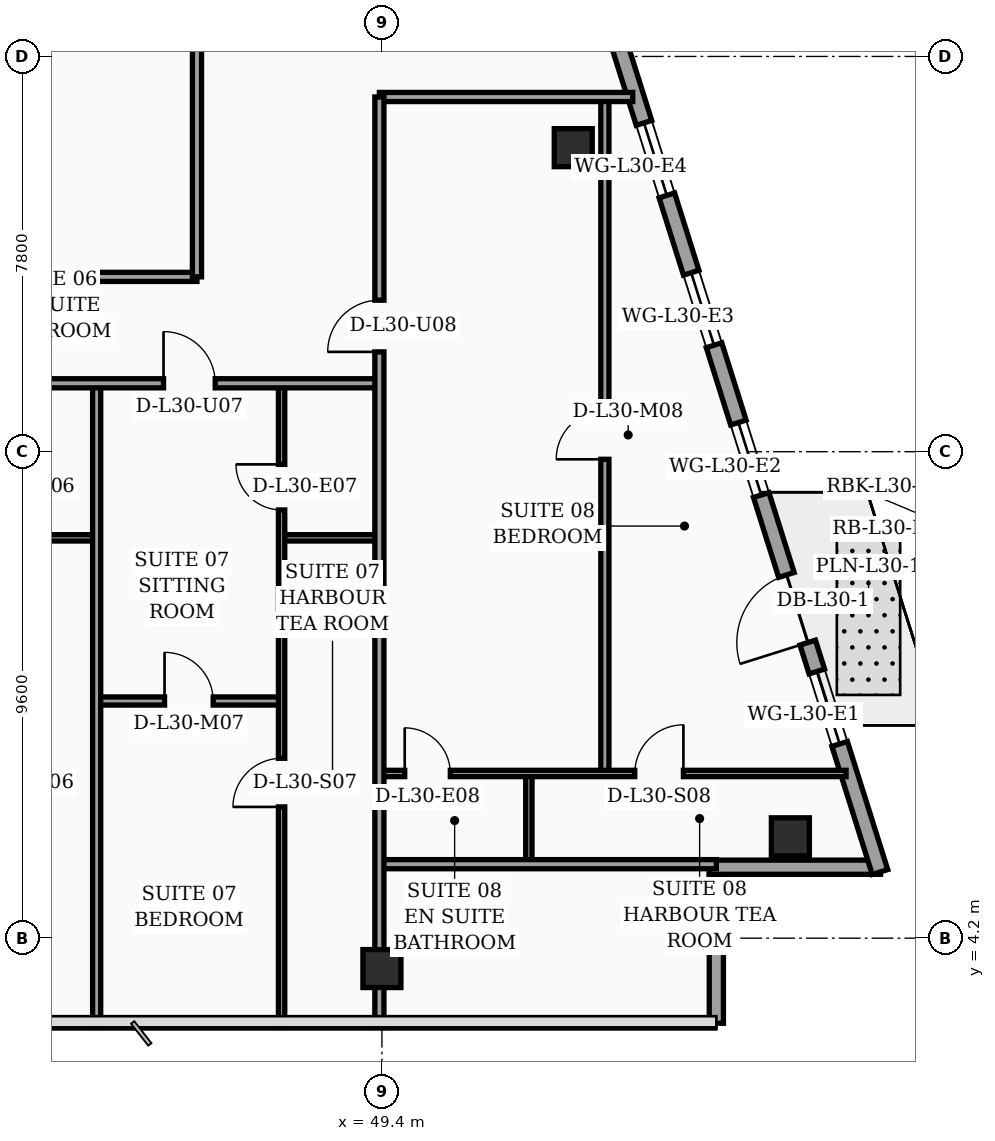
"""IFC4 building model, lengths in metres.
Left out: names, types, materials, properties, quantities, classifications, styles, units other than length and angle.
Written with IfcOpenShell. Run it as: python <this file> out.ifc"""

import sys

from ifc_helpers import new_model, si_unit, direction, frame, frame_2d, origin, origin_2d, place, context, subcontext, project, spatial, rectangle, hollow_rectangle, extrude, element, fill, save


model = new_model("IFC4")
c1 = context("Model", 3, precision=1e-05, world=origin(), true_north=direction((0.0, 1.0)))
c2 = subcontext(c1, "Body", "Model", "MODEL_VIEW")
j1 = project(units=[si_unit("LENGTHUNIT", "METRE"), si_unit("PLANEANGLEUNIT", "RADIAN")], contexts=[c1])
p1 = place(None, origin())
s1 = spatial("IfcSite", under=j1, at=p1, CompositionType="ELEMENT")
p2 = place(p1, origin())
s2 = spatial("IfcBuilding", under=s1, at=p2, CompositionType="ELEMENT")
p3 = place(p2, frame((0.0, 0.0, 124.0)))
s3 = spatial("IfcBuildingStorey", under=s2, at=p3, CompositionType="ELEMENT", Elevation=124.0)
for number, where, z_axis, x_axis in (
    (1, (49.4, 3.6, 0.0), (0.0, 0.0, 1.0), (1.0, 0.0, 0.0)),
    (2, (57.461, 6.2, 0.0), (0.0, 0.0, 1.0), (1.0, 0.0, 0.0)),
    (3, (53.176, 19.8, 0.0), (0.0, 0.0, 1.0), (1.0, 0.0, 0.0)),
):
    element("IfcColumn", number, at=place(p3, frame(where, z_axis=z_axis, x_axis=x_axis)), inside=s3, PredefinedType="COLUMN", context=c2, shape_type="SweptSolid", body=[
        extrude(hollow_rectangle(XDim=0.75, YDim=0.75, WallThickness=0.032, at=origin_2d()), origin(), (0.0, 0.0, 1.0), 3.56),
    ])
p4 = place(p3, frame((56.0, 2.52, 0.0), z_axis=(0.0, 0.0, 1.0), x_axis=(0.0, 1.0, 0.0)))
e4 = element("IfcWall", 4, at=p4, inside=s3, PredefinedType="SOLIDWALL", context=c2, shape_type="SweptSolid", body=[
    extrude(rectangle(XDim=2.94, YDim=0.28, at=frame_2d((1.47, 0.0))), origin(), (0.0, 0.0, 1.0), 3.04),
])
p5 = place(p3, frame((55.86, 5.6, 0.0), z_axis=(0.0, 0.0, 1.0), x_axis=(1.0, 0.0, 0.0)))
e5 = element("IfcWall", 5, at=p5, inside=s3, PredefinedType="SOLIDWALL", context=c2, shape_type="SweptSolid", body=[
    extrude(rectangle(XDim=3.38, YDim=0.28, at=frame_2d((1.69, 0.0))), origin(), (0.0, 0.0, 1.0), 3.04),
])
p6 = place(p3, frame((59.23, 5.505, 0.0), z_axis=(0.0, 0.0, 1.0), x_axis=(-0.300509063924, 0.953778958931, 0.0)))
e6 = element("IfcWall", 6, at=p6, inside=s3, PredefinedType="SOLIDWALL", context=c2, shape_type="SweptSolid", body=[
    extrude(rectangle(XDim=30.814, YDim=0.32, at=frame_2d((15.407, 0.0))), origin(), (0.0, 0.0, 1.0), 3.56),
])
p7 = place(p6, frame((4.747, 0.0, 0.0)))
e7 = element("IfcOpeningElement", 7, at=p7, cuts=e6, PredefinedType="OPENING", context=c2, shape_type="SweptSolid", body=[
    extrude(rectangle(XDim=1.4, YDim=2.25, at=frame_2d((0.7, 1.125))), frame((0.0, 0.17, 0.0), z_axis=(0.0, -1.0, 0.0), x_axis=(1.0, 0.0, 0.0)), (0.0, 0.0, 1.0), 0.34),
])
p8 = place(p6, frame((2.65, 0.0, 0.75)))
e8 = element("IfcOpeningElement", 8, at=p8, cuts=e6, PredefinedType="OPENING", context=c2, shape_type="SweptSolid", body=[
    extrude(rectangle(XDim=1.5, YDim=1.6, at=frame_2d((0.75, 0.8))), frame((0.0, 0.17, 0.0), z_axis=(0.0, -1.0, 0.0), x_axis=(1.0, 0.0, 0.0)), (0.0, 0.0, 1.0), 0.34),
])
p9 = place(p6, frame((7.8, 0.0, 0.75)))
e9 = element("IfcOpeningElement", 9, at=p9, cuts=e6, PredefinedType="OPENING", context=c2, shape_type="SweptSolid", body=[
    extrude(rectangle(XDim=1.5, YDim=1.6, at=frame_2d((0.75, 0.8))), frame((0.0, 0.17, 0.0), z_axis=(0.0, -1.0, 0.0), x_axis=(1.0, 0.0, 0.0)), (0.0, 0.0, 1.0), 0.34),
])
p10 = place(p6, frame((10.9, 0.0, 0.75)))
e10 = element("IfcOpeningElement", 10, at=p10, cuts=e6, PredefinedType="OPENING", context=c2, shape_type="SweptSolid", body=[
    extrude(rectangle(XDim=1.5, YDim=1.6, at=frame_2d((0.75, 0.8))), frame((0.0, 0.17, 0.0), z_axis=(0.0, -1.0, 0.0), x_axis=(1.0, 0.0, 0.0)), (0.0, 0.0, 1.0), 0.34),
])
p11 = place(p6, frame((14.0, 0.0, 0.75)))
e11 = element("IfcOpeningElement", 11, at=p11, cuts=e6, PredefinedType="OPENING", context=c2, shape_type="SweptSolid", body=[
    extrude(rectangle(XDim=1.5, YDim=1.6, at=frame_2d((0.75, 0.8))), frame((0.0, 0.17, 0.0), z_axis=(0.0, -1.0, 0.0), x_axis=(1.0, 0.0, 0.0)), (0.0, 0.0, 1.0), 0.34),
])
p12 = place(p6, frame((17.1, 0.0, 0.75)))
e12 = element("IfcOpeningElement", 12, at=p12, cuts=e6, PredefinedType="OPENING", context=c2, shape_type="SweptSolid", body=[
    extrude(rectangle(XDim=1.5, YDim=1.6, at=frame_2d((0.75, 0.8))), frame((0.0, 0.17, 0.0), z_axis=(0.0, -1.0, 0.0), x_axis=(1.0, 0.0, 0.0)), (0.0, 0.0, 1.0), 0.34),
])
p13 = place(p6, frame((20.2, 0.0, 0.75)))
e13 = element("IfcOpeningElement", 13, at=p13, cuts=e6, PredefinedType="OPENING", context=c2, shape_type="SweptSolid", body=[
    extrude(rectangle(XDim=1.5, YDim=1.6, at=frame_2d((0.75, 0.8))), frame((0.0, 0.17, 0.0), z_axis=(0.0, -1.0, 0.0), x_axis=(1.0, 0.0, 0.0)), (0.0, 0.0, 1.0), 0.34),
])
p14 = place(p6, frame((23.3, 0.0, 0.75)))
e14 = element("IfcOpeningElement", 14, at=p14, cuts=e6, PredefinedType="OPENING", context=c2, shape_type="SweptSolid", body=[
    extrude(rectangle(XDim=1.5, YDim=1.6, at=frame_2d((0.75, 0.8))), frame((0.0, 0.17, 0.0), z_axis=(0.0, -1.0, 0.0), x_axis=(1.0, 0.0, 0.0)), (0.0, 0.0, 1.0), 0.34),
])
p15 = place(p6, frame((26.4, 0.0, 0.75)))
e15 = element("IfcOpeningElement", 15, at=p15, cuts=e6, PredefinedType="OPENING", context=c2, shape_type="SweptSolid", body=[
    extrude(rectangle(XDim=1.5, YDim=1.6, at=frame_2d((0.75, 0.8))), frame((0.0, 0.17, 0.0), z_axis=(0.0, -1.0, 0.0), x_axis=(1.0, 0.0, 0.0)), (0.0, 0.0, 1.0), 0.34),
])
p16 = place(p3, frame((41.84, 12.1, 0.0), z_axis=(0.0, 0.0, 1.0), x_axis=(1.0, 0.0, 0.0)))
e16 = element("IfcWall", 16, at=p16, inside=s3, PredefinedType="PARTITIONING", context=c2, shape_type="SweptSolid", body=[
    extrude(rectangle(XDim=1.93, YDim=0.125, at=frame_2d((0.965, 0.0))), origin(), (0.0, 0.0, 1.0), 3.56),
])
p17 = place(p3, frame((47.42, 12.1, 0.0), z_axis=(0.0, 0.0, 1.0), x_axis=(1.0, 0.0, 0.0)))
e17 = element("IfcWall", 17, at=p17, inside=s3, PredefinedType="PARTITIONING", context=c2, shape_type="SweptSolid", body=[
    extrude(rectangle(XDim=1.93, YDim=0.125, at=frame_2d((0.965, 0.0))), origin(), (0.0, 0.0, 1.0), 2.84),
])
p18 = place(p3, frame((43.77, 8.88, 0.0), z_axis=(0.0, 0.0, 1.0), x_axis=(1.0, 0.0, 0.0)))
e18 = element("IfcWall", 18, at=p18, inside=s3, PredefinedType="PARTITIONING", context=c2, shape_type="SweptSolid", body=[
    extrude(rectangle(XDim=3.65, YDim=0.16, at=frame_2d((1.825, 0.0))), origin(), (0.0, 0.0, 1.0), 3.56),
])
p19 = place(p18, frame((1.34, 0.0, 0.0)))
e19 = element("IfcOpeningElement", 19, at=p19, cuts=e18, PredefinedType="OPENING", context=c2, shape_type="SweptSolid", body=[
    extrude(rectangle(XDim=0.96, YDim=2.2, at=frame_2d((0.48, 1.1))), frame((0.0, 0.09, 0.0), z_axis=(0.0, -1.0, 0.0), x_axis=(1.0, 0.0, 0.0)), (0.0, 0.0, 1.0), 0.18),
])
p20 = place(p3, frame((47.42, 2.44, 0.0), z_axis=(0.0, 0.0, 1.0), x_axis=(0.0, 1.0, 0.0)))
e20 = element("IfcWall", 20, at=p20, inside=s3, PredefinedType="PARTITIONING", context=c2, shape_type="SweptSolid", body=[
    extrude(rectangle(XDim=12.71, YDim=0.125, at=frame_2d((6.355, 0.0))), origin(), (0.0, 0.0, 1.0), 2.84),
])
p21 = place(p20, frame((4.35, 0.0, 0.0)))
e21 = element("IfcOpeningElement", 21, at=p21, cuts=e20, PredefinedType="OPENING", context=c2, shape_type="SweptSolid", body=[
    extrude(rectangle(XDim=0.96, YDim=2.2, at=frame_2d((0.48, 1.1))), frame((0.0, 0.073, 0.0), z_axis=(0.0, -1.0, 0.0), x_axis=(1.0, 0.0, 0.0)), (0.0, 0.0, 1.0), 0.145),
])
p22 = place(p20, frame((10.21, 0.0, 0.0)))
e22 = element("IfcOpeningElement", 22, at=p22, cuts=e20, PredefinedType="OPENING", context=c2, shape_type="SweptSolid", body=[
    extrude(rectangle(XDim=0.9, YDim=2.15, at=frame_2d((0.45, 1.075))), frame((0.0, 0.073, 0.0), z_axis=(0.0, -1.0, 0.0), x_axis=(1.0, 0.0, 0.0)), (0.0, 0.0, 1.0), 0.145),
])
p23 = place(p3, frame((43.77, 2.44, 0.0), z_axis=(0.0, 0.0, 1.0), x_axis=(0.0, 1.0, 0.0)))
e23 = element("IfcWall", 23, at=p23, inside=s3, PredefinedType="PARTITIONING", context=c2, shape_type="SweptSolid", body=[
    extrude(rectangle(XDim=12.71, YDim=0.16, at=frame_2d((6.355, 0.0))), origin(), (0.0, 0.0, 1.0), 3.04),
])
p24 = place(p3, frame((32.4, 15.15, 0.0), z_axis=(0.0, 0.0, 1.0), x_axis=(1.0, 0.0, 0.0)))
e24 = element("IfcWall", 24, at=p24, inside=s3, PredefinedType="PARTITIONING", context=c2, shape_type="SweptSolid", body=[
    extrude(rectangle(XDim=16.95, YDim=0.18, at=frame_2d((8.475, 0.0))), origin(), (0.0, 0.0, 1.0), 2.84),
])
p25 = place(p24, frame((1.1, 0.0, 0.0)))
e25 = element("IfcOpeningElement", 25, at=p25, cuts=e24, PredefinedType="OPENING", context=c2, shape_type="SweptSolid", body=[
    extrude(rectangle(XDim=1.5, YDim=2.22, at=frame_2d((0.75, 1.11))), frame((0.0, 0.1, 0.0), z_axis=(0.0, -1.0, 0.0), x_axis=(1.0, 0.0, 0.0)), (0.0, 0.0, 1.0), 0.2),
])
p26 = place(p24, frame((6.78, 0.0, 0.0)))
e26 = element("IfcOpeningElement", 26, at=p26, cuts=e24, PredefinedType="OPENING", context=c2, shape_type="SweptSolid", body=[
    extrude(rectangle(XDim=1.02, YDim=2.2, at=frame_2d((0.51, 1.1))), frame((0.0, 0.1, 0.0), z_axis=(0.0, -1.0, 0.0), x_axis=(1.0, 0.0, 0.0)), (0.0, 0.0, 1.0), 0.2),
])
p27 = place(p24, frame((12.69, 0.0, 0.0)))
e27 = element("IfcOpeningElement", 27, at=p27, cuts=e24, PredefinedType="OPENING", context=c2, shape_type="SweptSolid", body=[
    extrude(rectangle(XDim=1.02, YDim=2.2, at=frame_2d((0.51, 1.1))), frame((0.0, 0.1, 0.0), z_axis=(0.0, -1.0, 0.0), x_axis=(1.0, 0.0, 0.0)), (0.0, 0.0, 1.0), 0.2),
])
p28 = place(p3, frame((21.5, 17.25, 0.0), z_axis=(0.0, 0.0, 1.0), x_axis=(1.0, 0.0, 0.0)))
e28 = element("IfcWall", 28, at=p28, inside=s3, PredefinedType="PARTITIONING", context=c2, shape_type="SweptSolid", body=[
    extrude(rectangle(XDim=24.25, YDim=0.18, at=frame_2d((12.125, 0.0))), origin(), (0.0, 0.0, 1.0), 2.84),
])
p29 = place(p28, frame((0.95, 0.0, 0.0)))
e29 = element("IfcOpeningElement", 29, at=p29, cuts=e28, PredefinedType="OPENING", context=c2, shape_type="SweptSolid", body=[
    extrude(rectangle(XDim=1.02, YDim=2.2, at=frame_2d((0.51, 1.1))), frame((0.0, 0.1, 0.0), z_axis=(0.0, -1.0, 0.0), x_axis=(1.0, 0.0, 0.0)), (0.0, 0.0, 1.0), 0.2),
])
p30 = place(p28, frame((9.0, 0.0, 0.0)))
e30 = element("IfcOpeningElement", 30, at=p30, cuts=e28, PredefinedType="OPENING", context=c2, shape_type="SweptSolid", body=[
    extrude(rectangle(XDim=1.02, YDim=2.2, at=frame_2d((0.51, 1.1))), frame((0.0, 0.1, 0.0), z_axis=(0.0, -1.0, 0.0), x_axis=(1.0, 0.0, 0.0)), (0.0, 0.0, 1.0), 0.2),
])
p31 = place(p28, frame((17.05, 0.0, 0.0)))
e31 = element("IfcOpeningElement", 31, at=p31, cuts=e28, PredefinedType="OPENING", context=c2, shape_type="SweptSolid", body=[
    extrude(rectangle(XDim=1.02, YDim=2.2, at=frame_2d((0.51, 1.1))), frame((0.0, 0.1, 0.0), z_axis=(0.0, -1.0, 0.0), x_axis=(1.0, 0.0, 0.0)), (0.0, 0.0, 1.0), 0.2),
])
p32 = place(p3, frame((45.75, 17.25, 0.0), z_axis=(0.0, 0.0, 1.0), x_axis=(0.0, 1.0, 0.0)))
e32 = element("IfcWall", 32, at=p32, inside=s3, PredefinedType="PARTITIONING", context=c2, shape_type="SweptSolid", body=[
    extrude(rectangle(XDim=20.69, YDim=0.18, at=frame_2d((10.345, 0.0))), origin(), (0.0, 0.0, 1.0), 2.84),
])
p33 = place(p3, frame((52.3, 5.66, 0.0), z_axis=(0.0, 0.0, 1.0), x_axis=(0.0, 1.0, 0.0)))
e33 = element("IfcWall", 33, at=p33, inside=s3, PredefinedType="PARTITIONING", context=c2, shape_type="SweptSolid", body=[
    extrude(rectangle(XDim=1.79, YDim=0.125, at=frame_2d((0.895, 0.0))), origin(), (0.0, 0.0, 1.0), 3.56),
])
p34 = place(p3, frame((53.8, 7.45, 0.0), z_axis=(0.0, 0.0, 1.0), x_axis=(0.0, 1.0, 0.0)))
e34 = element("IfcWall", 34, at=p34, inside=s3, PredefinedType="PARTITIONING", context=c2, shape_type="SweptSolid", body=[
    extrude(rectangle(XDim=13.35, YDim=0.16, at=frame_2d((6.675, 0.0))), origin(), (0.0, 0.0, 1.0), 3.04),
])
p35 = place(p34, frame((6.2, 0.0, 0.0)))
e35 = element("IfcOpeningElement", 35, at=p35, cuts=e34, PredefinedType="OPENING", context=c2, shape_type="SweptSolid", body=[
    extrude(rectangle(XDim=0.96, YDim=2.2, at=frame_2d((0.48, 1.1))), frame((0.0, 0.09, 0.0), z_axis=(0.0, -1.0, 0.0), x_axis=(1.0, 0.0, 0.0)), (0.0, 0.0, 1.0), 0.18),
])
p36 = place(p3, frame((49.35, 7.45, 0.0), z_axis=(0.0, 0.0, 1.0), x_axis=(1.0, 0.0, 0.0)))
e36 = element("IfcWall", 36, at=p36, inside=s3, PredefinedType="PARTITIONING", context=c2, shape_type="SweptSolid", body=[
    extrude(rectangle(XDim=9.21, YDim=0.125, at=frame_2d((4.605, 0.0))), origin(), (0.0, 0.0, 1.0), 3.04),
])
p37 = place(p36, frame((0.5, 0.0, 0.0)))
e37 = element("IfcOpeningElement", 37, at=p37, cuts=e36, PredefinedType="OPENING", context=c2, shape_type="SweptSolid", body=[
    extrude(rectangle(XDim=0.9, YDim=2.15, at=frame_2d((0.45, 1.075))), frame((0.0, 0.073, 0.0), z_axis=(0.0, -1.0, 0.0), x_axis=(1.0, 0.0, 0.0)), (0.0, 0.0, 1.0), 0.145),
])
p38 = place(p36, frame((5.04, 0.0, 0.0)))
e38 = element("IfcOpeningElement", 38, at=p38, cuts=e36, PredefinedType="OPENING", context=c2, shape_type="SweptSolid", body=[
    extrude(rectangle(XDim=0.96, YDim=2.2, at=frame_2d((0.48, 1.1))), frame((0.0, 0.073, 0.0), z_axis=(0.0, -1.0, 0.0), x_axis=(1.0, 0.0, 0.0)), (0.0, 0.0, 1.0), 0.145),
])
p39 = place(p3, frame((49.35, 5.66, 0.0), z_axis=(0.0, 0.0, 1.0), x_axis=(1.0, 0.0, 0.0)))
e39 = element("IfcWall", 39, at=p39, inside=s3, PredefinedType="PARTITIONING", context=c2, shape_type="SweptSolid", body=[
    extrude(rectangle(XDim=6.65, YDim=0.18, at=frame_2d((3.325, 0.0))), origin(), (0.0, 0.0, 1.0), 2.84),
])
p40 = place(p3, frame((49.35, 20.8, 0.0), z_axis=(0.0, 0.0, 1.0), x_axis=(1.0, 0.0, 0.0)))
e40 = element("IfcWall", 40, at=p40, inside=s3, PredefinedType="PARTITIONING", context=c2, shape_type="SweptSolid", body=[
    extrude(rectangle(XDim=5.0, YDim=0.18, at=frame_2d((2.5, 0.0))), origin(), (0.0, 0.0, 1.0), 3.04),
])
p41 = place(p3, frame((49.35, 2.44, 0.0), z_axis=(0.0, 0.0, 1.0), x_axis=(0.0, 1.0, 0.0)))
e41 = element("IfcWall", 41, at=p41, inside=s3, PredefinedType="PARTITIONING", context=c2, shape_type="SweptSolid", body=[
    extrude(rectangle(XDim=18.36, YDim=0.18, at=frame_2d((9.18, 0.0))), origin(), (0.0, 0.0, 1.0), 2.84),
])
p42 = place(p41, frame((13.33, 0.0, 0.0)))
e42 = element("IfcOpeningElement", 42, at=p42, cuts=e41, PredefinedType="OPENING", context=c2, shape_type="SweptSolid", body=[
    extrude(rectangle(XDim=1.02, YDim=2.2, at=frame_2d((0.51, 1.1))), frame((0.0, 0.1, 0.0), z_axis=(0.0, -1.0, 0.0), x_axis=(1.0, 0.0, 0.0)), (0.0, 0.0, 1.0), 0.2),
])
p43 = place(p7, origin())
e43 = element("IfcDoor", 43, at=p43, inside=s3, OperationType="SINGLE_SWING_LEFT", PredefinedType="DOOR", context=c2, shape_type="SweptSolid", body=[
    extrude(rectangle(XDim=1.4, YDim=2.25, at=frame_2d((0.7, 1.125))), frame((0.0, 0.025, 0.0), z_axis=(0.0, -1.0, 0.0), x_axis=(1.0, 0.0, 0.0)), (0.0, 0.0, 1.0), 0.05),
])
fill(e7, e43)
p44 = place(p8, origin())
e44 = element("IfcWindow", 44, at=p44, inside=s3, PartitioningType="SINGLE_PANEL", PredefinedType="WINDOW", context=c2, shape_type="SweptSolid", body=[
    extrude(rectangle(XDim=1.5, YDim=1.6, at=frame_2d((0.75, 0.8))), frame((0.0, 0.03, 0.0), z_axis=(0.0, -1.0, 0.0), x_axis=(1.0, 0.0, 0.0)), (0.0, 0.0, 1.0), 0.06),
])
fill(e8, e44)
p45 = place(p9, origin())
e45 = element("IfcWindow", 45, at=p45, inside=s3, PartitioningType="SINGLE_PANEL", PredefinedType="WINDOW", context=c2, shape_type="SweptSolid", body=[
    extrude(rectangle(XDim=1.5, YDim=1.6, at=frame_2d((0.75, 0.8))), frame((0.0, 0.03, 0.0), z_axis=(0.0, -1.0, 0.0), x_axis=(1.0, 0.0, 0.0)), (0.0, 0.0, 1.0), 0.06),
])
fill(e9, e45)
p46 = place(p10, origin())
e46 = element("IfcWindow", 46, at=p46, inside=s3, PartitioningType="SINGLE_PANEL", PredefinedType="WINDOW", context=c2, shape_type="SweptSolid", body=[
    extrude(rectangle(XDim=1.5, YDim=1.6, at=frame_2d((0.75, 0.8))), frame((0.0, 0.03, 0.0), z_axis=(0.0, -1.0, 0.0), x_axis=(1.0, 0.0, 0.0)), (0.0, 0.0, 1.0), 0.06),
])
fill(e10, e46)
p47 = place(p11, origin())
e47 = element("IfcWindow", 47, at=p47, inside=s3, PartitioningType="SINGLE_PANEL", PredefinedType="WINDOW", context=c2, shape_type="SweptSolid", body=[
    extrude(rectangle(XDim=1.5, YDim=1.6, at=frame_2d((0.75, 0.8))), frame((0.0, 0.03, 0.0), z_axis=(0.0, -1.0, 0.0), x_axis=(1.0, 0.0, 0.0)), (0.0, 0.0, 1.0), 0.06),
])
fill(e11, e47)
p48 = place(p19, origin())
e48 = element("IfcDoor", 48, at=p48, inside=s3, OperationType="SINGLE_SWING_LEFT", PredefinedType="DOOR", context=c2, shape_type="SweptSolid", body=[
    extrude(rectangle(XDim=0.96, YDim=2.2, at=frame_2d((0.48, 1.1))), frame((0.0, 0.025, 0.0), z_axis=(0.0, -1.0, 0.0), x_axis=(1.0, 0.0, 0.0)), (0.0, 0.0, 1.0), 0.05),
])
fill(e19, e48)
p49 = place(p21, origin())
e49 = element("IfcDoor", 49, at=p49, inside=s3, OperationType="SINGLE_SWING_LEFT", PredefinedType="DOOR", context=c2, shape_type="SweptSolid", body=[
    extrude(rectangle(XDim=0.96, YDim=2.2, at=frame_2d((0.48, 1.1))), frame((0.0, 0.025, 0.0), z_axis=(0.0, -1.0, 0.0), x_axis=(1.0, 0.0, 0.0)), (0.0, 0.0, 1.0), 0.05),
])
fill(e21, e49)
p50 = place(p22, origin())
e50 = element("IfcDoor", 50, at=p50, inside=s3, OperationType="SINGLE_SWING_RIGHT", PredefinedType="DOOR", context=c2, shape_type="SweptSolid", body=[
    extrude(rectangle(XDim=0.9, YDim=2.15, at=frame_2d((0.45, 1.075))), frame((0.0, 0.025, 0.0), z_axis=(0.0, -1.0, 0.0), x_axis=(1.0, 0.0, 0.0)), (0.0, 0.0, 1.0), 0.05),
])
fill(e22, e50)
p51 = place(p27, origin())
e51 = element("IfcDoor", 51, at=p51, inside=s3, OperationType="SINGLE_SWING_LEFT", PredefinedType="DOOR", context=c2, shape_type="SweptSolid", body=[
    extrude(rectangle(XDim=1.02, YDim=2.2, at=frame_2d((0.51, 1.1))), frame((0.0, 0.025, 0.0), z_axis=(0.0, -1.0, 0.0), x_axis=(1.0, 0.0, 0.0)), (0.0, 0.0, 1.0), 0.05),
])
fill(e27, e51)
p52 = place(p35, origin())
e52 = element("IfcDoor", 52, at=p52, inside=s3, OperationType="SINGLE_SWING_LEFT", PredefinedType="DOOR", context=c2, shape_type="SweptSolid", body=[
    extrude(rectangle(XDim=0.96, YDim=2.2, at=frame_2d((0.48, 1.1))), frame((0.0, 0.025, 0.0), z_axis=(0.0, -1.0, 0.0), x_axis=(1.0, 0.0, 0.0)), (0.0, 0.0, 1.0), 0.05),
])
fill(e35, e52)
p53 = place(p37, origin())
e53 = element("IfcDoor", 53, at=p53, inside=s3, OperationType="SINGLE_SWING_LEFT", PredefinedType="DOOR", context=c2, shape_type="SweptSolid", body=[
    extrude(rectangle(XDim=0.9, YDim=2.15, at=frame_2d((0.45, 1.075))), frame((0.0, 0.025, 0.0), z_axis=(0.0, -1.0, 0.0), x_axis=(1.0, 0.0, 0.0)), (0.0, 0.0, 1.0), 0.05),
])
fill(e37, e53)
p54 = place(p38, origin())
e54 = element("IfcDoor", 54, at=p54, inside=s3, OperationType="SINGLE_SWING_RIGHT", PredefinedType="DOOR", context=c2, shape_type="SweptSolid", body=[
    extrude(rectangle(XDim=0.96, YDim=2.2, at=frame_2d((0.48, 1.1))), frame((0.0, 0.025, 0.0), z_axis=(0.0, -1.0, 0.0), x_axis=(1.0, 0.0, 0.0)), (0.0, 0.0, 1.0), 0.05),
])
fill(e38, e54)
p55 = place(p42, origin())
e55 = element("IfcDoor", 55, at=p55, inside=s3, OperationType="SINGLE_SWING_LEFT", PredefinedType="DOOR", context=c2, shape_type="SweptSolid", body=[
    extrude(rectangle(XDim=1.02, YDim=2.2, at=frame_2d((0.51, 1.1))), frame((0.0, 0.025, 0.0), z_axis=(0.0, -1.0, 0.0), x_axis=(1.0, 0.0, 0.0)), (0.0, 0.0, 1.0), 0.05),
])
fill(e42, e55)
save(model, sys.argv[1])
